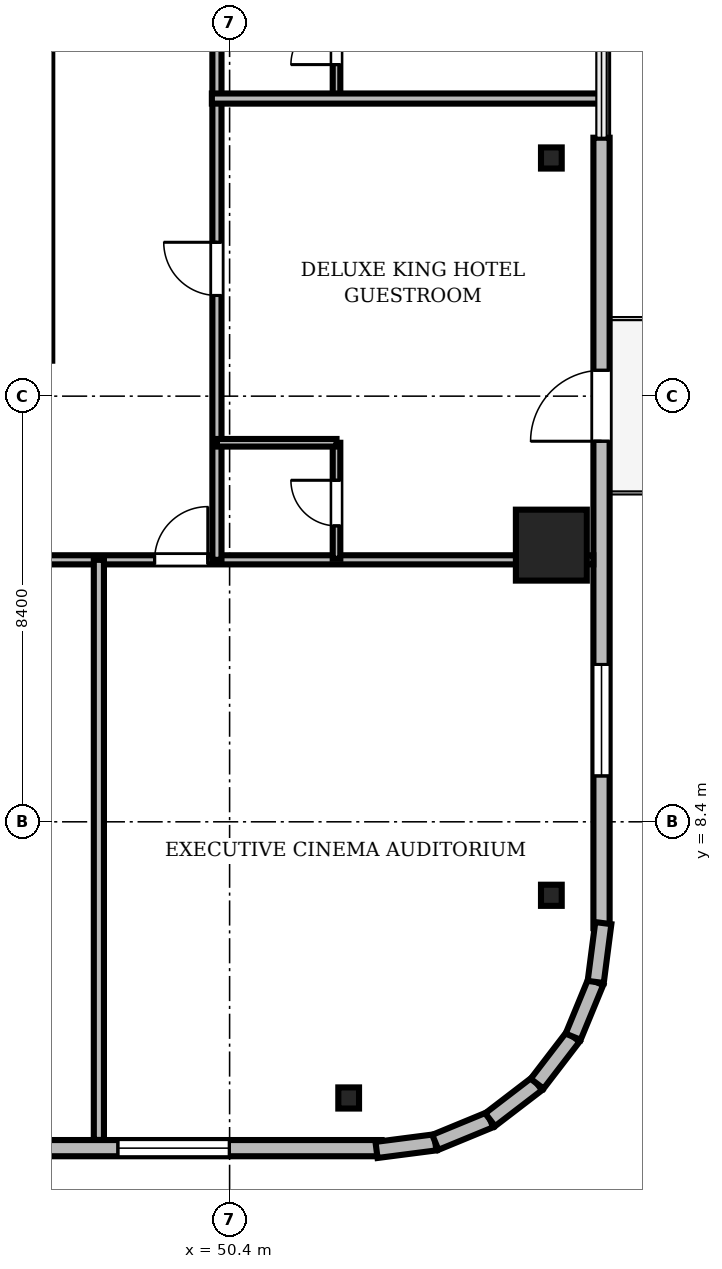
"""IFC4 building model, lengths in metres.
Left out: names, types, materials, properties, quantities, classifications, styles, units other than length and angle.
Written with IfcOpenShell. Run it as: python <this file> out.ifc"""

import sys

from ifc_helpers import new_model, si_unit, direction, frame, frame_2d, origin, origin_2d, place, context, subcontext, project, spatial, rectangle, i_section, extrude, source, transform, mapped, element, fill, save


model = new_model("IFC4")
c1 = context("Model", 3, precision=1e-05, world=origin(), true_north=direction((0.0, 1.0)))
c2 = subcontext(c1, "Body", "Model", "MODEL_VIEW")
j1 = project(units=[si_unit("LENGTHUNIT", "METRE"), si_unit("PLANEANGLEUNIT", "RADIAN")], contexts=[c1])
p1 = place(None, origin())
s1 = spatial("IfcSite", under=j1, at=p1, CompositionType="ELEMENT")
p2 = place(p1, origin())
s2 = spatial("IfcBuilding", under=s1, at=p2, CompositionType="ELEMENT")
p3 = place(p2, frame((0.0, 0.0, 222.3)))
s3 = spatial("IfcBuildingStorey", under=s2, at=p3, CompositionType="ELEMENT", Elevation=222.3)
m1 = source(origin(), c2, "Body", "SweptSolid", [
    extrude(rectangle(XDim=13.15, YDim=0.8, at=frame_2d((6.575, 0.0))), origin(), (0.0, 0.0, 1.0), 3.53),
])
p4 = place(p3, frame((46.5, 17.5, 0.0), z_axis=(0.0, 0.0, 1.0), x_axis=(0.0, 1.0, 0.0)))
e1 = element("IfcWall", 1, at=p4, inside=s3, PredefinedType="SHEAR", context=c2, shape_type="MappedRepresentation", body=[
    mapped(m1, transform((0.0, 0.0, 0.0), scale=1.0)),
])
m2 = source(origin(), c2, "Body", "SweptSolid", [
    extrude(rectangle(XDim=1.4, YDim=1.4, at=origin_2d()), origin(), (0.0, 0.0, 1.0), 3.53),
])
p5 = place(p3, frame((56.75, 13.86, 0.0), z_axis=(0.0, 0.0, 1.0), x_axis=(1.0, 0.0, 0.0)))
e2 = element("IfcColumn", 2, at=p5, inside=s3, PredefinedType="COLUMN", context=c2, shape_type="MappedRepresentation", body=[
    mapped(m2, transform((0.0, 0.0, 0.0), scale=1.0)),
])
m3 = source(origin(), c2, "Body", "SweptSolid", [
    extrude(i_section(OverallWidth=0.409, OverallDepth=0.417, WebThickness=0.021, FlangeThickness=0.033, FilletRadius=0.015, at=origin_2d()), origin(), (0.0, 0.0, 1.0), 3.53),
])
for number, where, z_axis, x_axis in (
    (3, (52.75, 2.95, 0.0), (0.0, 0.0, 1.0), (1.0, 0.0, 0.0)),
    (4, (56.75, 6.95, 0.0), (0.0, 0.0, 1.0), (1.0, 0.0, 0.0)),
    (5, (56.75, 21.5, 0.0), (0.0, 0.0, 1.0), (1.0, 0.0, 0.0)),
):
    element("IfcColumn", number, at=place(p3, frame(where, z_axis=z_axis, x_axis=x_axis)), inside=s3, PredefinedType="COLUMN", context=c2, shape_type="MappedRepresentation", body=[
        mapped(m3, transform((0.0, 0.0, 0.0), scale=1.0)),
    ])
m4 = source(origin(), c2, "Body", "SweptSolid", [
    extrude(rectangle(XDim=15.6, YDim=0.32, at=frame_2d((7.8, 0.0))), origin(), (0.0, 0.0, 1.0), 3.53),
])
p6 = place(p3, frame((37.8, 1.96, 0.0), z_axis=(0.0, 0.0, 1.0), x_axis=(1.0, 0.0, 0.0)))
e6 = element("IfcWall", 6, at=p6, inside=s3, PredefinedType="SOLIDWALL", context=c2, shape_type="MappedRepresentation", body=[
    mapped(m4, transform((0.0, 0.0, 0.0), scale=1.0)),
])
m5 = source(origin(), c2, "Body", "SweptSolid", [
    extrude(rectangle(XDim=1.4, YDim=2.3, at=frame_2d((0.7, 1.15))), frame((0.0, 0.17, 0.0), z_axis=(0.0, -1.0, 0.0), x_axis=(1.0, 0.0, 0.0)), (0.0, 0.0, 1.0), 0.34),
])
p7 = place(p6, frame((4.59, 0.0, 0.0)))
e7 = element("IfcOpeningElement", 7, at=p7, cuts=e6, PredefinedType="OPENING", context=c2, shape_type="MappedRepresentation", body=[
    mapped(m5, transform((0.0, 0.0, 0.0), scale=1.0)),
])
m6 = source(origin(), c2, "Body", "SweptSolid", [
    extrude(rectangle(XDim=2.2, YDim=2.4, at=frame_2d((1.1, 1.2))), frame((0.0, 0.17, 0.0), z_axis=(0.0, -1.0, 0.0), x_axis=(1.0, 0.0, 0.0)), (0.0, 0.0, 1.0), 0.34),
])
p8 = place(p6, frame((10.395, 0.0, 0.72)))
e8 = element("IfcOpeningElement", 8, at=p8, cuts=e6, PredefinedType="OPENING", context=c2, shape_type="MappedRepresentation", body=[
    mapped(m6, transform((0.0, 0.0, 0.0), scale=1.0)),
])
p9 = place(p3, frame((57.74, 6.3, 0.0), z_axis=(0.0, 0.0, 1.0), x_axis=(0.0, 1.0, 0.0)))
e9 = element("IfcWall", 9, at=p9, inside=s3, PredefinedType="SOLIDWALL", context=c2, shape_type="MappedRepresentation", body=[
    mapped(m4, transform((0.0, 0.0, 0.0), scale=1.0)),
])
p10 = place(p9, frame((9.61, 0.0, 0.0)))
e10 = element("IfcOpeningElement", 10, at=p10, cuts=e9, PredefinedType="OPENING", context=c2, shape_type="MappedRepresentation", body=[
    mapped(m5, transform((0.0, 0.0, 0.0), scale=1.0)),
])
p11 = place(p9, frame((3.005, 0.0, 0.72)))
e11 = element("IfcOpeningElement", 11, at=p11, cuts=e9, PredefinedType="OPENING", context=c2, shape_type="MappedRepresentation", body=[
    mapped(m6, transform((0.0, 0.0, 0.0), scale=1.0)),
])
m7 = source(origin(), c2, "Body", "SweptSolid", [
    extrude(rectangle(XDim=1.17, YDim=0.32, at=frame_2d((0.585, 0.0))), origin(), (0.0, 0.0, 1.0), 3.53),
])
p12 = place(p3, frame((53.3, 1.925, 0.0), z_axis=(0.0, 0.0, 1.0), x_axis=(0.991762485493, 0.128090485085, 0.0)))
e12 = element("IfcWall", 12, at=p12, inside=s3, PredefinedType="SOLIDWALL", context=c2, shape_type="MappedRepresentation", body=[
    mapped(m7, transform((0.0, 0.0, 0.0), scale=1.0)),
])
m8 = source(origin(), c2, "Body", "SweptSolid", [
    extrude(rectangle(XDim=1.169, YDim=0.32, at=frame_2d((0.585, 0.0))), origin(), (0.0, 0.0, 1.0), 3.53),
])
p13 = place(p3, frame((54.46, 2.074, 0.0), z_axis=(0.0, 0.0, 1.0), x_axis=(0.924479075121, 0.381232789334, 0.0)))
e13 = element("IfcWall", 13, at=p13, inside=s3, PredefinedType="SOLIDWALL", context=c2, shape_type="MappedRepresentation", body=[
    mapped(m8, transform((0.0, 0.0, 0.0), scale=1.0)),
])
m9 = source(origin(), c2, "Body", "SweptSolid", [
    extrude(rectangle(XDim=1.169, YDim=0.32, at=frame_2d((0.584, 0.0))), origin(), (0.0, 0.0, 1.0), 3.53),
])
p14 = place(p3, frame((55.541, 2.52, 0.0), z_axis=(0.0, 0.0, 1.0), x_axis=(0.793663520347, 0.608356981114, 0.0)))
e14 = element("IfcWall", 14, at=p14, inside=s3, PredefinedType="SOLIDWALL", context=c2, shape_type="MappedRepresentation", body=[
    mapped(m9, transform((0.0, 0.0, 0.0), scale=1.0)),
])
m10 = source(origin(), c2, "Body", "SweptSolid", [
    extrude(rectangle(XDim=1.169, YDim=0.32, at=frame_2d((0.584, 0.0))), origin(), (0.0, 0.0, 1.0), 3.53),
])
for number, where, z_axis, x_axis in (
    (15, (56.469, 3.231, 0.0), (0.0, 0.0, 1.0), (0.608, 0.794, 0.0)),
    (16, (57.18, 4.159, 0.0), (0.0, 0.0, 1.0), (0.381, 0.925, 0.0)),
):
    element("IfcWall", number, at=place(p3, frame(where, z_axis=z_axis, x_axis=x_axis)), inside=s3, PredefinedType="SOLIDWALL", context=c2, shape_type="MappedRepresentation", body=[
        mapped(m10, transform((0.0, 0.0, 0.0), scale=1.0)),
    ])
m11 = source(origin(), c2, "Body", "SweptSolid", [
    extrude(rectangle(XDim=1.171, YDim=0.32, at=frame_2d((0.585, 0.0))), origin(), (0.0, 0.0, 1.0), 3.53),
])
p15 = place(p3, frame((57.625, 5.24, 0.0), z_axis=(0.0, 0.0, 1.0), x_axis=(0.128269133229, 0.991739395941, 0.0)))
e17 = element("IfcWall", 17, at=p15, inside=s3, PredefinedType="SOLIDWALL", context=c2, shape_type="MappedRepresentation", body=[
    mapped(m11, transform((0.0, 0.0, 0.0), scale=1.0)),
])
m12 = source(origin(), c2, "Body", "SweptSolid", [
    extrude(rectangle(XDim=46.156, YDim=0.18, at=frame_2d((23.078, 0.0))), origin(), (0.0, 0.0, 1.0), 2.772),
])
p16 = place(p3, frame((11.422, 13.57, 0.0), z_axis=(0.0, 0.0, 1.0), x_axis=(1.0, 0.0, 0.0)))
e18 = element("IfcWall", 18, at=p16, inside=s3, PredefinedType="PARTITIONING", context=c2, shape_type="MappedRepresentation", body=[
    mapped(m12, transform((0.0, 0.0, 0.0), scale=1.0)),
])
m13 = source(origin(), c2, "Body", "SweptSolid", [
    extrude(rectangle(XDim=1.05, YDim=2.2, at=frame_2d((0.525, 1.1))), frame((0.0, 0.1, 0.0), z_axis=(0.0, -1.0, 0.0), x_axis=(1.0, 0.0, 0.0)), (0.0, 0.0, 1.0), 0.2),
])
p17 = place(p16, frame((10.438, 0.0, 0.0)))
e19 = element("IfcOpeningElement", 19, at=p17, cuts=e18, PredefinedType="OPENING", context=c2, shape_type="MappedRepresentation", body=[
    mapped(m13, transform((0.0, 0.0, 0.0), scale=1.0)),
])
p18 = place(p16, frame((12.993, 0.0, 0.0)))
e20 = element("IfcOpeningElement", 20, at=p18, cuts=e18, PredefinedType="OPENING", context=c2, shape_type="MappedRepresentation", body=[
    mapped(m13, transform((0.0, 0.0, 0.0), scale=1.0)),
])
p19 = place(p16, frame((16.443, 0.0, 0.0)))
e21 = element("IfcOpeningElement", 21, at=p19, cuts=e18, PredefinedType="OPENING", context=c2, shape_type="MappedRepresentation", body=[
    mapped(m13, transform((0.0, 0.0, 0.0), scale=1.0)),
])
p20 = place(p16, frame((20.121, 0.0, 0.0)))
e22 = element("IfcOpeningElement", 22, at=p20, cuts=e18, PredefinedType="OPENING", context=c2, shape_type="MappedRepresentation", body=[
    mapped(m13, transform((0.0, 0.0, 0.0), scale=1.0)),
])
p21 = place(p16, frame((24.124, 0.0, 0.0)))
e23 = element("IfcOpeningElement", 23, at=p21, cuts=e18, PredefinedType="OPENING", context=c2, shape_type="MappedRepresentation", body=[
    mapped(m13, transform((0.0, 0.0, 0.0), scale=1.0)),
])
p22 = place(p16, frame((29.261, 0.0, 0.0)))
e24 = element("IfcOpeningElement", 24, at=p22, cuts=e18, PredefinedType="OPENING", context=c2, shape_type="MappedRepresentation", body=[
    mapped(m13, transform((0.0, 0.0, 0.0), scale=1.0)),
])
p23 = place(p16, frame((34.113, 0.0, 0.0)))
e25 = element("IfcOpeningElement", 25, at=p23, cuts=e18, PredefinedType="OPENING", context=c2, shape_type="MappedRepresentation", body=[
    mapped(m13, transform((0.0, 0.0, 0.0), scale=1.0)),
])
p24 = place(p16, frame((37.498, 0.0, 0.0)))
e26 = element("IfcOpeningElement", 26, at=p24, cuts=e18, PredefinedType="OPENING", context=c2, shape_type="MappedRepresentation", body=[
    mapped(m13, transform((0.0, 0.0, 0.0), scale=1.0)),
])
m14 = source(origin(), c2, "Body", "SweptSolid", [
    extrude(rectangle(XDim=27.53, YDim=0.18, at=frame_2d((13.765, 0.0))), origin(), (0.0, 0.0, 1.0), 2.972),
])
p25 = place(p3, frame((50.15, 13.57, 0.0), z_axis=(0.0, 0.0, 1.0), x_axis=(0.0, 1.0, 0.0)))
e27 = element("IfcWall", 27, at=p25, inside=s3, PredefinedType="PARTITIONING", context=c2, shape_type="MappedRepresentation", body=[
    mapped(m14, transform((0.0, 0.0, 0.0), scale=1.0)),
])
p26 = place(p25, frame((5.217, 0.0, 0.0)))
e28 = element("IfcOpeningElement", 28, at=p26, cuts=e27, PredefinedType="OPENING", context=c2, shape_type="MappedRepresentation", body=[
    mapped(m13, transform((0.0, 0.0, 0.0), scale=1.0)),
])
p27 = place(p25, frame((14.32, 0.0, 0.0)))
e29 = element("IfcOpeningElement", 29, at=p27, cuts=e27, PredefinedType="OPENING", context=c2, shape_type="MappedRepresentation", body=[
    mapped(m13, transform((0.0, 0.0, 0.0), scale=1.0)),
])
p28 = place(p25, frame((23.423, 0.0, 0.0)))
e30 = element("IfcOpeningElement", 30, at=p28, cuts=e27, PredefinedType="OPENING", context=c2, shape_type="MappedRepresentation", body=[
    mapped(m13, transform((0.0, 0.0, 0.0), scale=1.0)),
])
m15 = source(origin(), c2, "Body", "SweptSolid", [
    extrude(rectangle(XDim=2.29, YDim=0.15, at=frame_2d((1.145, 0.0))), origin(), (0.0, 0.0, 1.0), 2.972),
])
p29 = place(p3, frame((52.51, 13.59, 0.0), z_axis=(0.0, 0.0, 1.0), x_axis=(0.0, 1.0, 0.0)))
e31 = element("IfcWall", 31, at=p29, inside=s3, PredefinedType="PARTITIONING", context=c2, shape_type="MappedRepresentation", body=[
    mapped(m15, transform((0.0, 0.0, 0.0), scale=1.0)),
])
m16 = source(origin(), c2, "Body", "SweptSolid", [
    extrude(rectangle(XDim=0.9, YDim=2.1, at=frame_2d((0.45, 1.05))), frame((0.0, 0.085, 0.0), z_axis=(0.0, -1.0, 0.0), x_axis=(1.0, 0.0, 0.0)), (0.0, 0.0, 1.0), 0.17),
])
p30 = place(p29, frame((0.65, 0.0, 0.0)))
e32 = element("IfcOpeningElement", 32, at=p30, cuts=e31, PredefinedType="OPENING", context=c2, shape_type="MappedRepresentation", body=[
    mapped(m16, transform((0.0, 0.0, 0.0), scale=1.0)),
])
m17 = source(origin(), c2, "Body", "SweptSolid", [
    extrude(rectangle(XDim=2.29, YDim=0.15, at=frame_2d((1.145, 0.0))), origin(), (0.0, 0.0, 1.0), 3.222),
])
p31 = place(p3, frame((52.51, 22.693, 0.0), z_axis=(0.0, 0.0, 1.0), x_axis=(0.0, 1.0, 0.0)))
e33 = element("IfcWall", 33, at=p31, inside=s3, PredefinedType="PARTITIONING", context=c2, shape_type="MappedRepresentation", body=[
    mapped(m17, transform((0.0, 0.0, 0.0), scale=1.0)),
])
p32 = place(p31, frame((0.65, 0.0, 0.0)))
e34 = element("IfcOpeningElement", 34, at=p32, cuts=e33, PredefinedType="OPENING", context=c2, shape_type="MappedRepresentation", body=[
    mapped(m16, transform((0.0, 0.0, 0.0), scale=1.0)),
])
m18 = source(origin(), c2, "Body", "SweptSolid", [
    extrude(rectangle(XDim=11.448, YDim=0.2, at=frame_2d((5.724, 0.0))), origin(), (0.0, 0.0, 1.0), 2.772),
])
p33 = place(p3, frame((47.82, 2.122, 0.0), z_axis=(0.0, 0.0, 1.0), x_axis=(0.0, 1.0, 0.0)))
e35 = element("IfcWall", 35, at=p33, inside=s3, PredefinedType="PARTITIONING", context=c2, shape_type="MappedRepresentation", body=[
    mapped(m18, transform((0.0, 0.0, 0.0), scale=1.0)),
])
m19 = source(origin(), c2, "Body", "SweptSolid", [
    extrude(rectangle(XDim=7.72, YDim=0.2, at=frame_2d((3.86, 0.0))), origin(), (0.0, 0.0, 1.0), 2.772),
])
p34 = place(p3, frame((50.05, 22.673, 0.0), z_axis=(0.0, 0.0, 1.0), x_axis=(1.0, 0.0, 0.0)))
e36 = element("IfcWall", 36, at=p34, inside=s3, PredefinedType="PARTITIONING", context=c2, shape_type="MappedRepresentation", body=[
    mapped(m19, transform((0.0, 0.0, 0.0), scale=1.0)),
])
m20 = source(origin(), c2, "Body", "SweptSolid", [
    extrude(rectangle(XDim=2.36, YDim=0.15, at=frame_2d((1.18, 0.0))), origin(), (0.0, 0.0, 1.0), 3.53),
])
p35 = place(p3, frame((50.15, 15.88, 0.0), z_axis=(0.0, 0.0, 1.0), x_axis=(1.0, 0.0, 0.0)))
e37 = element("IfcWall", 37, at=p35, inside=s3, PredefinedType="PARTITIONING", context=c2, shape_type="MappedRepresentation", body=[
    mapped(m20, transform((0.0, 0.0, 0.0), scale=1.0)),
])
m21 = source(origin(), c2, "Body", "SweptSolid", [
    extrude(rectangle(XDim=2.2, YDim=2.4, at=frame_2d((1.1, 1.2))), frame((0.0, 0.03, 0.0), z_axis=(0.0, -1.0, 0.0), x_axis=(1.0, 0.0, 0.0)), (0.0, 0.0, 1.0), 0.06),
])
p36 = place(p8, origin())
e38 = element("IfcWindow", 38, at=p36, inside=s3, PartitioningType="SINGLE_PANEL", PredefinedType="WINDOW", context=c2, shape_type="MappedRepresentation", body=[
    mapped(m21, transform((0.0, 0.0, 0.0), scale=1.0)),
])
fill(e8, e38)
m22 = source(origin(), c2, "Body", "SweptSolid", [
    extrude(rectangle(XDim=1.4, YDim=2.3, at=frame_2d((0.7, 1.15))), frame((0.0, 0.025, 0.0), z_axis=(0.0, -1.0, 0.0), x_axis=(1.0, 0.0, 0.0)), (0.0, 0.0, 1.0), 0.05),
])
p37 = place(p10, frame((1.4, 0.0, 0.0), z_axis=(0.0, 0.0, 1.0), x_axis=(-1.0, 0.0, 0.0)))
e39 = element("IfcDoor", 39, at=p37, inside=s3, OperationType="DOUBLE_DOOR_SLIDING", PredefinedType="DOOR", context=c2, shape_type="MappedRepresentation", body=[
    mapped(m22, transform((0.0, 0.0, 0.0), scale=1.0)),
])
fill(e10, e39)
p38 = place(p11, origin())
e40 = element("IfcWindow", 40, at=p38, inside=s3, PartitioningType="SINGLE_PANEL", PredefinedType="WINDOW", context=c2, shape_type="MappedRepresentation", body=[
    mapped(m21, transform((0.0, 0.0, 0.0), scale=1.0)),
])
fill(e11, e40)
m23 = source(origin(), c2, "Body", "SweptSolid", [
    extrude(rectangle(XDim=1.05, YDim=2.2, at=frame_2d((0.525, 1.1))), frame((0.0, 0.025, 0.0), z_axis=(0.0, -1.0, 0.0), x_axis=(1.0, 0.0, 0.0)), (0.0, 0.0, 1.0), 0.05),
])
p39 = place(p24, origin())
e41 = element("IfcDoor", 41, at=p39, inside=s3, OperationType="SINGLE_SWING_RIGHT", PredefinedType="DOOR", context=c2, shape_type="MappedRepresentation", body=[
    mapped(m23, transform((0.0, 0.0, 0.0), scale=1.0)),
])
fill(e26, e41)
p40 = place(p26, origin())
e42 = element("IfcDoor", 42, at=p40, inside=s3, OperationType="SINGLE_SWING_RIGHT", PredefinedType="DOOR", context=c2, shape_type="MappedRepresentation", body=[
    mapped(m23, transform((0.0, 0.0, 0.0), scale=1.0)),
])
fill(e28, e42)
m24 = source(origin(), c2, "Body", "SweptSolid", [
    extrude(rectangle(XDim=0.9, YDim=2.1, at=frame_2d((0.45, 1.05))), frame((0.0, 0.025, 0.0), z_axis=(0.0, -1.0, 0.0), x_axis=(1.0, 0.0, 0.0)), (0.0, 0.0, 1.0), 0.05),
])
p41 = place(p30, origin())
e43 = element("IfcDoor", 43, at=p41, inside=s3, OperationType="SINGLE_SWING_RIGHT", PredefinedType="DOOR", context=c2, shape_type="MappedRepresentation", body=[
    mapped(m24, transform((0.0, 0.0, 0.0), scale=1.0)),
])
fill(e32, e43)
p42 = place(p32, origin())
e44 = element("IfcDoor", 44, at=p42, inside=s3, OperationType="SINGLE_SWING_LEFT", PredefinedType="DOOR", context=c2, shape_type="MappedRepresentation", body=[
    mapped(m24, transform((0.0, 0.0, 0.0), scale=1.0)),
])
fill(e34, e44)
save(model, sys.argv[1])
